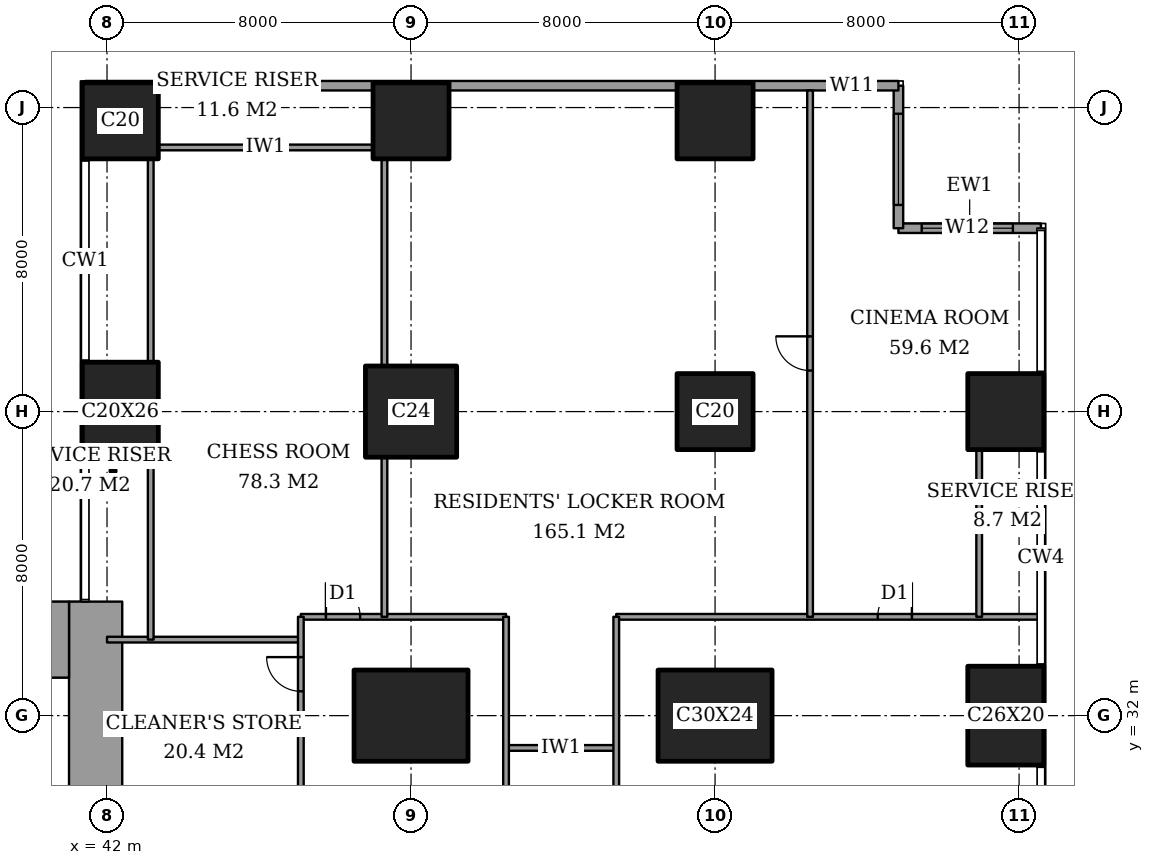
"""IFC4 building model, lengths in metres.
Left out: names, types, materials, properties, quantities, classifications, styles, units other than length and angle.
Written with IfcOpenShell. Run it as: python <this file> out.ifc"""

import sys

from ifc_helpers import new_model, si_unit, direction, frame, frame_2d, origin, origin_2d, place, context, subcontext, project, spatial, rectangle, extrude, element, fill, save


model = new_model("IFC4")
c1 = context("Model", 3, precision=1e-05, world=origin(), true_north=direction((0.0, 1.0)))
c2 = subcontext(c1, "Body", "Model", "MODEL_VIEW")
j1 = project(units=[si_unit("LENGTHUNIT", "METRE"), si_unit("PLANEANGLEUNIT", "RADIAN")], contexts=[c1])
p1 = place(None, origin())
s1 = spatial("IfcSite", under=j1, at=p1, CompositionType="ELEMENT")
p2 = place(p1, origin())
s2 = spatial("IfcBuilding", under=s1, at=p2, CompositionType="ELEMENT")
p3 = place(p2, frame((0.0, 0.0, 132.2)))
s3 = spatial("IfcBuildingStorey", under=s2, at=p3, CompositionType="ELEMENT", Elevation=132.2)
p4 = place(p3, frame((42.35, 40.0, 0.0), z_axis=(0.0, 0.0, 1.0), x_axis=(1.0, 0.0, 0.0)))
e1 = element("IfcColumn", 1, at=p4, inside=s3, PredefinedType="COLUMN", context=c2, shape_type="SweptSolid", body=[
    extrude(rectangle(XDim=2.0, YDim=2.6, at=origin_2d()), origin(), (0.0, 0.0, 1.0), 3.6),
])
p5 = place(p3, frame((42.35, 47.65, 0.0), z_axis=(0.0, 0.0, 1.0), x_axis=(1.0, 0.0, 0.0)))
e2 = element("IfcColumn", 2, at=p5, inside=s3, PredefinedType="COLUMN", context=c2, shape_type="SweptSolid", body=[
    extrude(rectangle(XDim=2.0, YDim=2.0, at=origin_2d()), origin(), (0.0, 0.0, 1.0), 3.6),
])
p6 = place(p3, frame((50.0, 32.0, 0.0), z_axis=(0.0, 0.0, 1.0), x_axis=(1.0, 0.0, 0.0)))
e3 = element("IfcColumn", 3, at=p6, inside=s3, PredefinedType="COLUMN", context=c2, shape_type="SweptSolid", body=[
    extrude(rectangle(XDim=3.0, YDim=2.4, at=origin_2d()), origin(), (0.0, 0.0, 1.0), 3.6),
])
p7 = place(p3, frame((50.0, 40.0, 0.0), z_axis=(0.0, 0.0, 1.0), x_axis=(1.0, 0.0, 0.0)))
e4 = element("IfcColumn", 4, at=p7, inside=s3, PredefinedType="COLUMN", context=c2, shape_type="SweptSolid", body=[
    extrude(rectangle(XDim=2.4, YDim=2.4, at=origin_2d()), origin(), (0.0, 0.0, 1.0), 3.6),
])
p8 = place(p3, frame((50.0, 47.65, 0.0), z_axis=(0.0, 0.0, 1.0), x_axis=(1.0, 0.0, 0.0)))
e5 = element("IfcColumn", 5, at=p8, inside=s3, PredefinedType="COLUMN", context=c2, shape_type="SweptSolid", body=[
    extrude(rectangle(XDim=2.0, YDim=2.0, at=origin_2d()), origin(), (0.0, 0.0, 1.0), 3.6),
])
p9 = place(p3, frame((58.0, 32.0, 0.0), z_axis=(0.0, 0.0, 1.0), x_axis=(1.0, 0.0, 0.0)))
e6 = element("IfcColumn", 6, at=p9, inside=s3, PredefinedType="COLUMN", context=c2, shape_type="SweptSolid", body=[
    extrude(rectangle(XDim=3.0, YDim=2.4, at=origin_2d()), origin(), (0.0, 0.0, 1.0), 3.6),
])
for number, where, z_axis, x_axis in (
    (7, (58.0, 40.0, 0.0), (0.0, 0.0, 1.0), (1.0, 0.0, 0.0)),
    (8, (58.0, 47.65, 0.0), (0.0, 0.0, 1.0), (1.0, 0.0, 0.0)),
):
    element("IfcColumn", number, at=place(p3, frame(where, z_axis=z_axis, x_axis=x_axis)), inside=s3, PredefinedType="COLUMN", context=c2, shape_type="SweptSolid", body=[
        extrude(rectangle(XDim=2.0, YDim=2.0, at=origin_2d()), origin(), (0.0, 0.0, 1.0), 3.6),
    ])
p10 = place(p3, frame((65.65, 32.0, 0.0), z_axis=(0.0, 0.0, 1.0), x_axis=(0.0, 1.0, 0.0)))
e9 = element("IfcColumn", 9, at=p10, inside=s3, PredefinedType="COLUMN", context=c2, shape_type="SweptSolid", body=[
    extrude(rectangle(XDim=2.6, YDim=2.0, at=origin_2d()), origin(), (0.0, 0.0, 1.0), 3.6),
])
p11 = place(p3, frame((65.65, 40.0, 0.0), z_axis=(0.0, 0.0, 1.0), x_axis=(1.0, 0.0, 0.0)))
e10 = element("IfcColumn", 10, at=p11, inside=s3, PredefinedType="COLUMN", context=c2, shape_type="SweptSolid", body=[
    extrude(rectangle(XDim=2.0, YDim=2.0, at=origin_2d()), origin(), (0.0, 0.0, 1.0), 3.6),
])
p12 = place(p3, frame((37.85, 34.0, 0.0), z_axis=(0.0, 0.0, 1.0), x_axis=(1.0, 0.0, 0.0)))
e11 = element("IfcWall", 11, at=p12, inside=s3, PredefinedType="SHEAR", context=c2, shape_type="SweptSolid", body=[
    extrude(rectangle(XDim=3.15, YDim=2.0, at=frame_2d((1.575, 0.0))), origin(), (0.0, 0.0, 1.0), 3.6),
])
p13 = place(p3, frame((41.7, 24.85, 0.0), z_axis=(0.0, 0.0, 1.0), x_axis=(0.0, 1.0, 0.0)))
e12 = element("IfcWall", 12, at=p13, inside=s3, PredefinedType="SHEAR", context=c2, shape_type="SweptSolid", body=[
    extrude(rectangle(XDim=10.15, YDim=1.4, at=frame_2d((5.075, 0.0))), origin(), (0.0, 0.0, 1.0), 3.6),
])
p14 = place(p3, frame((66.575, 44.825, 0.0), z_axis=(0.0, 0.0, 1.0), x_axis=(-1.0, 0.0, 0.0)))
e13 = element("IfcWall", 13, at=p14, inside=s3, PredefinedType="SOLIDWALL", context=c2, shape_type="SweptSolid", body=[
    extrude(rectangle(XDim=3.75, YDim=0.25, at=frame_2d((1.875, 0.0))), origin(), (0.0, 0.0, 1.0), 3.6),
])
p15 = place(p14, frame((0.738, 0.0, 0.4)))
e14 = element("IfcOpeningElement", 14, at=p15, cuts=e13, PredefinedType="OPENING", context=c2, shape_type="SweptSolid", body=[
    extrude(rectangle(XDim=2.4, YDim=2.2, at=frame_2d((1.2, 1.1))), frame((0.0, 0.135, 0.0), z_axis=(0.0, -1.0, 0.0), x_axis=(1.0, 0.0, 0.0)), (0.0, 0.0, 1.0), 0.27),
])
p16 = place(p3, frame((62.825, 44.825, 0.0), z_axis=(0.0, 0.0, 1.0), x_axis=(0.0, 1.0, 0.0)))
e15 = element("IfcWall", 15, at=p16, inside=s3, PredefinedType="SOLIDWALL", context=c2, shape_type="SweptSolid", body=[
    extrude(rectangle(XDim=3.75, YDim=0.25, at=frame_2d((1.875, 0.0))), origin(), (0.0, 0.0, 1.0), 3.6),
])
p17 = place(p16, frame((0.613, 0.0, 0.4)))
e16 = element("IfcOpeningElement", 16, at=p17, cuts=e15, PredefinedType="OPENING", context=c2, shape_type="SweptSolid", body=[
    extrude(rectangle(XDim=2.4, YDim=2.2, at=frame_2d((1.2, 1.1))), frame((0.0, 0.135, 0.0), z_axis=(0.0, -1.0, 0.0), x_axis=(1.0, 0.0, 0.0)), (0.0, 0.0, 1.0), 0.27),
])
p18 = place(p3, frame((62.825, 48.575, 0.0), z_axis=(0.0, 0.0, 1.0), x_axis=(-1.0, 0.0, 0.0)))
e17 = element("IfcWall", 17, at=p18, inside=s3, PredefinedType="SOLIDWALL", context=c2, shape_type="SweptSolid", body=[
    extrude(rectangle(XDim=21.4, YDim=0.25, at=frame_2d((10.7, 0.0))), origin(), (0.0, 0.0, 1.0), 3.6),
])
p19 = place(p18, frame((0.625, 0.0, 0.4)))
e18 = element("IfcOpeningElement", 18, at=p19, cuts=e17, PredefinedType="OPENING", context=c2, shape_type="SweptSolid", body=[
    extrude(rectangle(XDim=1.2, YDim=2.2, at=frame_2d((0.6, 1.1))), frame((0.0, 0.135, 0.0), z_axis=(0.0, -1.0, 0.0), x_axis=(1.0, 0.0, 0.0)), (0.0, 0.0, 1.0), 0.27),
])
p20 = place(p3, frame((52.5, 31.15, 0.0), z_axis=(0.0, 0.0, 1.0), x_axis=(1.0, 0.0, 0.0)))
e19 = element("IfcWall", 19, at=p20, inside=s3, PredefinedType="PARTITIONING", context=c2, shape_type="SweptSolid", body=[
    extrude(rectangle(XDim=2.9, YDim=0.15, at=frame_2d((1.45, 0.0))), origin(), (0.0, 0.0, 1.0), 3.35),
])
p21 = place(p3, frame((42.0, 34.0, 0.0), z_axis=(0.0, 0.0, 1.0), x_axis=(1.0, 0.0, 0.0)))
e20 = element("IfcWall", 20, at=p21, inside=s3, PredefinedType="PARTITIONING", context=c2, shape_type="SweptSolid", body=[
    extrude(rectangle(XDim=5.1, YDim=0.15, at=frame_2d((2.55, 0.0))), origin(), (0.0, 0.0, 1.0), 3.35),
])
p22 = place(p3, frame((47.1, 34.6, 0.0), z_axis=(0.0, 0.0, 1.0), x_axis=(1.0, 0.0, 0.0)))
e21 = element("IfcWall", 21, at=p22, inside=s3, PredefinedType="PARTITIONING", context=c2, shape_type="SweptSolid", body=[
    extrude(rectangle(XDim=5.4, YDim=0.15, at=frame_2d((2.7, 0.0))), origin(), (0.0, 0.0, 1.0), 3.35),
])
p23 = place(p22, frame((0.66, 0.0, 0.0)))
e22 = element("IfcOpeningElement", 22, at=p23, cuts=e21, PredefinedType="OPENING", context=c2, shape_type="SweptSolid", body=[
    extrude(rectangle(XDim=0.9, YDim=2.1, at=frame_2d((0.45, 1.05))), frame((0.0, 0.085, 0.0), z_axis=(0.0, -1.0, 0.0), x_axis=(1.0, 0.0, 0.0)), (0.0, 0.0, 1.0), 0.17),
])
p24 = place(p3, frame((55.4, 34.6, 0.0), z_axis=(0.0, 0.0, 1.0), x_axis=(1.0, 0.0, 0.0)))
e23 = element("IfcWall", 23, at=p24, inside=s3, PredefinedType="PARTITIONING", context=c2, shape_type="SweptSolid", body=[
    extrude(rectangle(XDim=11.161, YDim=0.15, at=frame_2d((5.581, 0.0))), origin(), (0.0, 0.0, 1.0), 3.35),
])
p25 = place(p24, frame((6.88, 0.0, 0.0)))
e24 = element("IfcOpeningElement", 24, at=p25, cuts=e23, PredefinedType="OPENING", context=c2, shape_type="SweptSolid", body=[
    extrude(rectangle(XDim=0.9, YDim=2.1, at=frame_2d((0.45, 1.05))), frame((0.0, 0.085, 0.0), z_axis=(0.0, -1.0, 0.0), x_axis=(1.0, 0.0, 0.0)), (0.0, 0.0, 1.0), 0.17),
])
p26 = place(p3, frame((43.35, 46.95, 0.0), z_axis=(0.0, 0.0, 1.0), x_axis=(1.0, 0.0, 0.0)))
e25 = element("IfcWall", 25, at=p26, inside=s3, PredefinedType="PARTITIONING", context=c2, shape_type="SweptSolid", body=[
    extrude(rectangle(XDim=5.65, YDim=0.15, at=frame_2d((2.825, 0.0))), origin(), (0.0, 0.0, 1.0), 3.35),
])
p27 = place(p3, frame((43.15, 34.0, 0.0), z_axis=(0.0, 0.0, 1.0), x_axis=(0.0, 1.0, 0.0)))
e26 = element("IfcWall", 26, at=p27, inside=s3, PredefinedType="PARTITIONING", context=c2, shape_type="SweptSolid", body=[
    extrude(rectangle(XDim=4.7, YDim=0.15, at=frame_2d((2.35, 0.0))), origin(), (0.0, 0.0, 1.0), 3.35),
])
p28 = place(p3, frame((43.15, 41.3, 0.0), z_axis=(0.0, 0.0, 1.0), x_axis=(0.0, 1.0, 0.0)))
e27 = element("IfcWall", 27, at=p28, inside=s3, PredefinedType="PARTITIONING", context=c2, shape_type="SweptSolid", body=[
    extrude(rectangle(XDim=5.35, YDim=0.15, at=frame_2d((2.675, 0.0))), origin(), (0.0, 0.0, 1.0), 3.35),
])
p29 = place(p3, frame((47.1, 30.0, 0.0), z_axis=(0.0, 0.0, 1.0), x_axis=(0.0, 1.0, 0.0)))
e28 = element("IfcWall", 28, at=p29, inside=s3, PredefinedType="PARTITIONING", context=c2, shape_type="SweptSolid", body=[
    extrude(rectangle(XDim=4.6, YDim=0.15, at=frame_2d((2.3, 0.0))), origin(), (0.0, 0.0, 1.0), 3.35),
])
p30 = place(p29, frame((2.64, 0.0, 0.0)))
e29 = element("IfcOpeningElement", 29, at=p30, cuts=e28, PredefinedType="OPENING", context=c2, shape_type="SweptSolid", body=[
    extrude(rectangle(XDim=0.9, YDim=2.1, at=frame_2d((0.45, 1.05))), frame((0.0, 0.085, 0.0), z_axis=(0.0, -1.0, 0.0), x_axis=(1.0, 0.0, 0.0)), (0.0, 0.0, 1.0), 0.17),
])
p31 = place(p3, frame((49.3, 34.6, 0.0), z_axis=(0.0, 0.0, 1.0), x_axis=(0.0, 1.0, 0.0)))
e30 = element("IfcWall", 30, at=p31, inside=s3, PredefinedType="PARTITIONING", context=c2, shape_type="SweptSolid", body=[
    extrude(rectangle(XDim=4.2, YDim=0.15, at=frame_2d((2.1, 0.0))), origin(), (0.0, 0.0, 1.0), 3.35),
])
p32 = place(p3, frame((49.3, 41.2, 0.0), z_axis=(0.0, 0.0, 1.0), x_axis=(0.0, 1.0, 0.0)))
e31 = element("IfcWall", 31, at=p32, inside=s3, PredefinedType="PARTITIONING", context=c2, shape_type="SweptSolid", body=[
    extrude(rectangle(XDim=5.45, YDim=0.15, at=frame_2d((2.725, 0.0))), origin(), (0.0, 0.0, 1.0), 3.35),
])
p33 = place(p3, frame((52.5, 13.4, 0.0), z_axis=(0.0, 0.0, 1.0), x_axis=(0.0, 1.0, 0.0)))
e32 = element("IfcWall", 32, at=p33, inside=s3, PredefinedType="PARTITIONING", context=c2, shape_type="SweptSolid", body=[
    extrude(rectangle(XDim=21.2, YDim=0.15, at=frame_2d((10.6, 0.0))), origin(), (0.0, 0.0, 1.0), 3.35),
])
p34 = place(p33, frame((10.15, 0.0, 0.0)))
e33 = element("IfcOpeningElement", 33, at=p34, cuts=e32, PredefinedType="OPENING", context=c2, shape_type="SweptSolid", body=[
    extrude(rectangle(XDim=0.9, YDim=2.1, at=frame_2d((0.45, 1.05))), frame((0.0, 0.085, 0.0), z_axis=(0.0, -1.0, 0.0), x_axis=(1.0, 0.0, 0.0)), (0.0, 0.0, 1.0), 0.17),
])
p35 = place(p3, frame((55.4, 13.4, 0.0), z_axis=(0.0, 0.0, 1.0), x_axis=(0.0, 1.0, 0.0)))
e34 = element("IfcWall", 34, at=p35, inside=s3, PredefinedType="PARTITIONING", context=c2, shape_type="SweptSolid", body=[
    extrude(rectangle(XDim=21.2, YDim=0.15, at=frame_2d((10.6, 0.0))), origin(), (0.0, 0.0, 1.0), 3.35),
])
p36 = place(p35, frame((10.09, 0.0, 0.0)))
e35 = element("IfcOpeningElement", 35, at=p36, cuts=e34, PredefinedType="OPENING", context=c2, shape_type="SweptSolid", body=[
    extrude(rectangle(XDim=1.0, YDim=2.1, at=frame_2d((0.5, 1.05))), frame((0.0, 0.085, 0.0), z_axis=(0.0, -1.0, 0.0), x_axis=(1.0, 0.0, 0.0)), (0.0, 0.0, 1.0), 0.17),
])
p37 = place(p3, frame((60.5, 34.6, 0.0), z_axis=(0.0, 0.0, 1.0), x_axis=(0.0, 1.0, 0.0)))
e36 = element("IfcWall", 36, at=p37, inside=s3, PredefinedType="PARTITIONING", context=c2, shape_type="SweptSolid", body=[
    extrude(rectangle(XDim=13.85, YDim=0.15, at=frame_2d((6.925, 0.0))), origin(), (0.0, 0.0, 1.0), 3.35),
])
p38 = place(p37, frame((6.48, 0.0, 0.0)))
e37 = element("IfcOpeningElement", 37, at=p38, cuts=e36, PredefinedType="OPENING", context=c2, shape_type="SweptSolid", body=[
    extrude(rectangle(XDim=0.9, YDim=2.1, at=frame_2d((0.45, 1.05))), frame((0.0, 0.085, 0.0), z_axis=(0.0, -1.0, 0.0), x_axis=(1.0, 0.0, 0.0)), (0.0, 0.0, 1.0), 0.17),
])
p39 = place(p3, frame((64.95, 34.6, 0.0), z_axis=(0.0, 0.0, 1.0), x_axis=(0.0, 1.0, 0.0)))
e38 = element("IfcWall", 38, at=p39, inside=s3, PredefinedType="PARTITIONING", context=c2, shape_type="SweptSolid", body=[
    extrude(rectangle(XDim=4.4, YDim=0.15, at=frame_2d((2.2, 0.0))), origin(), (0.0, 0.0, 1.0), 3.35),
])
p40 = place(p15, origin())
e39 = element("IfcWindow", 39, at=p40, inside=s3, PartitioningType="SINGLE_PANEL", PredefinedType="WINDOW", context=c2, shape_type="SweptSolid", body=[
    extrude(rectangle(XDim=2.4, YDim=2.2, at=frame_2d((1.2, 1.1))), frame((0.0, 0.03, 0.0), z_axis=(0.0, -1.0, 0.0), x_axis=(1.0, 0.0, 0.0)), (0.0, 0.0, 1.0), 0.06),
])
fill(e14, e39)
p41 = place(p17, origin())
e40 = element("IfcWindow", 40, at=p41, inside=s3, PartitioningType="SINGLE_PANEL", PredefinedType="WINDOW", context=c2, shape_type="SweptSolid", body=[
    extrude(rectangle(XDim=2.4, YDim=2.2, at=frame_2d((1.2, 1.1))), frame((0.0, 0.03, 0.0), z_axis=(0.0, -1.0, 0.0), x_axis=(1.0, 0.0, 0.0)), (0.0, 0.0, 1.0), 0.06),
])
fill(e16, e40)
p42 = place(p19, origin())
e41 = element("IfcWindow", 41, at=p42, inside=s3, PartitioningType="SINGLE_PANEL", PredefinedType="WINDOW", context=c2, shape_type="SweptSolid", body=[
    extrude(rectangle(XDim=1.2, YDim=2.2, at=frame_2d((0.6, 1.1))), frame((0.0, 0.03, 0.0), z_axis=(0.0, -1.0, 0.0), x_axis=(1.0, 0.0, 0.0)), (0.0, 0.0, 1.0), 0.06),
])
fill(e18, e41)
p43 = place(p30, origin())
e42 = element("IfcDoor", 42, at=p43, inside=s3, OperationType="SINGLE_SWING_LEFT", PredefinedType="DOOR", context=c2, shape_type="SweptSolid", body=[
    extrude(rectangle(XDim=0.9, YDim=2.1, at=frame_2d((0.45, 1.05))), frame((0.0, 0.025, 0.0), z_axis=(0.0, -1.0, 0.0), x_axis=(1.0, 0.0, 0.0)), (0.0, 0.0, 1.0), 0.05),
])
fill(e29, e42)
p44 = place(p25, origin())
e43 = element("IfcDoor", 43, at=p44, inside=s3, OperationType="SINGLE_SWING_LEFT", PredefinedType="DOOR", context=c2, shape_type="SweptSolid", body=[
    extrude(rectangle(XDim=0.9, YDim=2.1, at=frame_2d((0.45, 1.05))), frame((0.0, 0.025, 0.0), z_axis=(0.0, -1.0, 0.0), x_axis=(1.0, 0.0, 0.0)), (0.0, 0.0, 1.0), 0.05),
])
fill(e24, e43)
p45 = place(p38, origin())
e44 = element("IfcDoor", 44, at=p45, inside=s3, OperationType="SINGLE_SWING_LEFT", PredefinedType="DOOR", context=c2, shape_type="SweptSolid", body=[
    extrude(rectangle(XDim=0.9, YDim=2.1, at=frame_2d((0.45, 1.05))), frame((0.0, 0.025, 0.0), z_axis=(0.0, -1.0, 0.0), x_axis=(1.0, 0.0, 0.0)), (0.0, 0.0, 1.0), 0.05),
])
fill(e37, e44)
p46 = place(p23, origin())
e45 = element("IfcDoor", 45, at=p46, inside=s3, OperationType="SINGLE_SWING_RIGHT", PredefinedType="DOOR", context=c2, shape_type="SweptSolid", body=[
    extrude(rectangle(XDim=0.9, YDim=2.1, at=frame_2d((0.45, 1.05))), frame((0.0, 0.025, 0.0), z_axis=(0.0, -1.0, 0.0), x_axis=(1.0, 0.0, 0.0)), (0.0, 0.0, 1.0), 0.05),
])
fill(e22, e45)
save(model, sys.argv[1])
